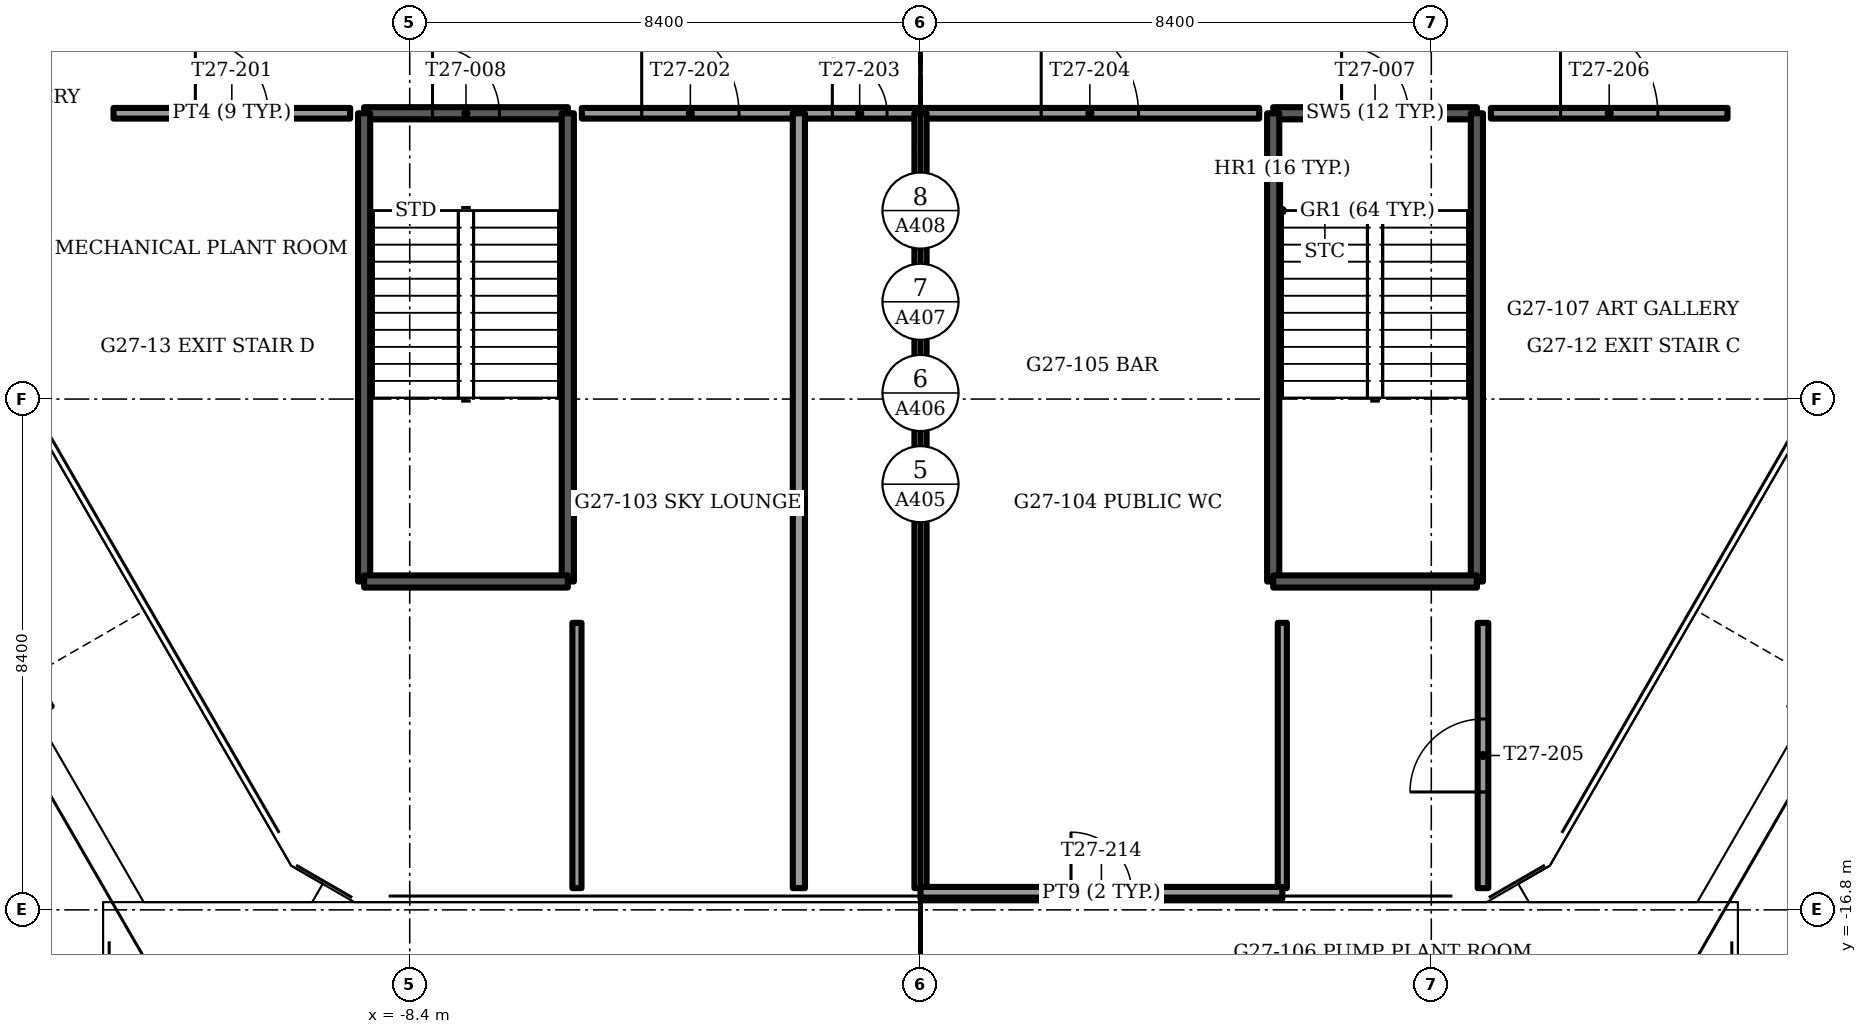
"""IFC4 building model, lengths in metres.
Left out: names, types, materials, properties, quantities, classifications, styles, units other than length and angle.
Written with IfcOpenShell. Run it as: python <this file> out.ifc"""

import sys

from ifc_helpers import new_model, si_unit, direction, frame, frame_2d, origin, place, context, subcontext, project, spatial, rectangle, extrude, element, fill, save


model = new_model("IFC4")
c1 = context("Model", 3, precision=1e-05, world=origin(), true_north=direction((0.0, 1.0)))
c2 = subcontext(c1, "Body", "Model", "MODEL_VIEW")
j1 = project(units=[si_unit("LENGTHUNIT", "METRE"), si_unit("PLANEANGLEUNIT", "RADIAN")], contexts=[c1])
p1 = place(None, origin())
s1 = spatial("IfcSite", under=j1, at=p1, CompositionType="ELEMENT")
p2 = place(p1, origin())
s2 = spatial("IfcBuilding", under=s1, at=p2, CompositionType="ELEMENT")
p3 = place(p2, frame((0.0, 0.0, 108.0)))
s3 = spatial("IfcBuildingStorey", under=s2, at=p3, CompositionType="ELEMENT", Elevation=108.0)
p4 = place(p3, frame((5.8, -3.7, -0.3), z_axis=(0.0, 0.0, 1.0), x_axis=(1.0, 0.0, 0.0)))
e1 = element("IfcWall", 1, at=p4, inside=s3, PredefinedType="SOLIDWALL", context=c2, shape_type="SweptSolid", body=[
    extrude(rectangle(XDim=3.35, YDim=0.2, at=frame_2d((1.675, 0.0))), origin(), (0.0, 0.0, 1.0), 8.0),
])
p5 = place(p4, frame((1.125, 0.0, 0.0)))
e2 = element("IfcOpeningElement", 2, at=p5, cuts=e1, PredefinedType="OPENING", context=c2, shape_type="SweptSolid", body=[
    extrude(rectangle(XDim=1.1, YDim=2.1, at=frame_2d((0.55, 1.05))), frame((0.0, 0.1, 0.0), z_axis=(0.0, -1.0, 0.0), x_axis=(1.0, 0.0, 0.0)), (0.0, 0.0, 1.0), 0.2),
])
for number, where, z_axis, x_axis in (
    (3, (5.8, -3.7, -0.3), (0.0, 0.0, 1.0), (0.0, -1.0, 0.0)),
    (4, (9.15, -3.7, -0.3), (0.0, 0.0, 1.0), (0.0, -1.0, 0.0)),
):
    element("IfcWall", number, at=place(p3, frame(where, z_axis=z_axis, x_axis=x_axis)), inside=s3, PredefinedType="SOLIDWALL", context=c2, shape_type="SweptSolid", body=[
        extrude(rectangle(XDim=7.7, YDim=0.2, at=frame_2d((3.85, 0.0))), origin(), (0.0, 0.0, 1.0), 8.0),
    ])
p6 = place(p3, frame((5.8, -11.4, -0.3), z_axis=(0.0, 0.0, 1.0), x_axis=(1.0, 0.0, 0.0)))
e5 = element("IfcWall", 5, at=p6, inside=s3, PredefinedType="SOLIDWALL", context=c2, shape_type="SweptSolid", body=[
    extrude(rectangle(XDim=3.35, YDim=0.2, at=frame_2d((1.675, 0.0))), origin(), (0.0, 0.0, 1.0), 8.0),
])
p7 = place(p3, frame((-9.15, -3.7, -0.3), z_axis=(0.0, 0.0, 1.0), x_axis=(1.0, 0.0, 0.0)))
e6 = element("IfcWall", 6, at=p7, inside=s3, PredefinedType="SOLIDWALL", context=c2, shape_type="SweptSolid", body=[
    extrude(rectangle(XDim=3.35, YDim=0.2, at=frame_2d((1.675, 0.0))), origin(), (0.0, 0.0, 1.0), 8.0),
])
p8 = place(p7, frame((1.125, 0.0, 0.0)))
e7 = element("IfcOpeningElement", 7, at=p8, cuts=e6, PredefinedType="OPENING", context=c2, shape_type="SweptSolid", body=[
    extrude(rectangle(XDim=1.1, YDim=2.1, at=frame_2d((0.55, 1.05))), frame((0.0, 0.1, 0.0), z_axis=(0.0, -1.0, 0.0), x_axis=(1.0, 0.0, 0.0)), (0.0, 0.0, 1.0), 0.2),
])
for number, where, z_axis, x_axis in (
    (8, (-9.15, -3.7, -0.3), (0.0, 0.0, 1.0), (0.0, -1.0, 0.0)),
    (9, (-5.8, -3.7, -0.3), (0.0, 0.0, 1.0), (0.0, -1.0, 0.0)),
):
    element("IfcWall", number, at=place(p3, frame(where, z_axis=z_axis, x_axis=x_axis)), inside=s3, PredefinedType="SOLIDWALL", context=c2, shape_type="SweptSolid", body=[
        extrude(rectangle(XDim=7.7, YDim=0.2, at=frame_2d((3.85, 0.0))), origin(), (0.0, 0.0, 1.0), 8.0),
    ])
p9 = place(p3, frame((-9.15, -11.4, -0.3), z_axis=(0.0, 0.0, 1.0), x_axis=(1.0, 0.0, 0.0)))
e10 = element("IfcWall", 10, at=p9, inside=s3, PredefinedType="SOLIDWALL", context=c2, shape_type="SweptSolid", body=[
    extrude(rectangle(XDim=3.35, YDim=0.2, at=frame_2d((1.675, 0.0))), origin(), (0.0, 0.0, 1.0), 8.0),
])
p10 = place(p3, frame((-13.271, -3.7, 0.0), z_axis=(0.0, 0.0, 1.0), x_axis=(1.0, 0.0, 0.0)))
e11 = element("IfcWall", 11, at=p10, inside=s3, PredefinedType="PARTITIONING", context=c2, shape_type="SweptSolid", body=[
    extrude(rectangle(XDim=3.891, YDim=0.175, at=frame_2d((1.946, 0.0))), origin(), (0.0, 0.0, 1.0), 7.7),
])
p11 = place(p10, frame((1.346, 0.0, 0.0)))
e12 = element("IfcOpeningElement", 12, at=p11, cuts=e11, PredefinedType="OPENING", context=c2, shape_type="SweptSolid", body=[
    extrude(rectangle(XDim=1.2, YDim=2.1, at=frame_2d((0.6, 1.05))), frame((0.0, 0.087, 0.0), z_axis=(0.0, -1.0, 0.0), x_axis=(1.0, 0.0, 0.0)), (0.0, 0.0, 1.0), 0.175),
])
p12 = place(p3, frame((-5.57, -3.7, 0.0), z_axis=(0.0, 0.0, 1.0), x_axis=(1.0, 0.0, 0.0)))
e13 = element("IfcWall", 13, at=p12, inside=s3, PredefinedType="PARTITIONING", context=c2, shape_type="SweptSolid", body=[
    extrude(rectangle(XDim=11.14, YDim=0.175, at=frame_2d((5.57, 0.0))), origin(), (0.0, 0.0, 1.0), 7.7),
])
p13 = place(p12, frame((0.985, 0.0, 0.0)))
e14 = element("IfcOpeningElement", 14, at=p13, cuts=e13, PredefinedType="OPENING", context=c2, shape_type="SweptSolid", body=[
    extrude(rectangle(XDim=1.6, YDim=2.1, at=frame_2d((0.8, 1.05))), frame((0.0, 0.087, 0.0), z_axis=(0.0, -1.0, 0.0), x_axis=(1.0, 0.0, 0.0)), (0.0, 0.0, 1.0), 0.175),
])
p14 = place(p12, frame((4.12, 0.0, 0.0)))
e15 = element("IfcOpeningElement", 15, at=p14, cuts=e13, PredefinedType="OPENING", context=c2, shape_type="SweptSolid", body=[
    extrude(rectangle(XDim=0.9, YDim=2.1, at=frame_2d((0.45, 1.05))), frame((0.0, 0.087, 0.0), z_axis=(0.0, -1.0, 0.0), x_axis=(1.0, 0.0, 0.0)), (0.0, 0.0, 1.0), 0.175),
])
p15 = place(p12, frame((7.555, 0.0, 0.0)))
e16 = element("IfcOpeningElement", 16, at=p15, cuts=e13, PredefinedType="OPENING", context=c2, shape_type="SweptSolid", body=[
    extrude(rectangle(XDim=1.6, YDim=2.1, at=frame_2d((0.8, 1.05))), frame((0.0, 0.087, 0.0), z_axis=(0.0, -1.0, 0.0), x_axis=(1.0, 0.0, 0.0)), (0.0, 0.0, 1.0), 0.175),
])
p16 = place(p3, frame((9.38, -3.7, 0.0), z_axis=(0.0, 0.0, 1.0), x_axis=(1.0, 0.0, 0.0)))
e17 = element("IfcWall", 17, at=p16, inside=s3, PredefinedType="PARTITIONING", context=c2, shape_type="SweptSolid", body=[
    extrude(rectangle(XDim=3.891, YDim=0.175, at=frame_2d((1.946, 0.0))), origin(), (0.0, 0.0, 1.0), 7.7),
])
p17 = place(p16, frame((1.146, 0.0, 0.0)))
e18 = element("IfcOpeningElement", 18, at=p17, cuts=e17, PredefinedType="OPENING", context=c2, shape_type="SweptSolid", body=[
    extrude(rectangle(XDim=1.6, YDim=2.1, at=frame_2d((0.8, 1.05))), frame((0.0, 0.087, 0.0), z_axis=(0.0, -1.0, 0.0), x_axis=(1.0, 0.0, 0.0)), (0.0, 0.0, 1.0), 0.175),
])
p18 = place(p3, frame((9.25, -16.442, 0.0), z_axis=(0.0, 0.0, 1.0), x_axis=(0.0, 1.0, 0.0)))
e19 = element("IfcWall", 19, at=p18, inside=s3, PredefinedType="PARTITIONING", context=c2, shape_type="SweptSolid", body=[
    extrude(rectangle(XDim=4.362, YDim=0.175, at=frame_2d((2.181, 0.0))), origin(), (0.0, 0.0, 1.0), 7.7),
])
p19 = place(p18, frame((1.581, 0.0, 0.0)))
e20 = element("IfcOpeningElement", 20, at=p19, cuts=e19, PredefinedType="OPENING", context=c2, shape_type="SweptSolid", body=[
    extrude(rectangle(XDim=1.2, YDim=2.1, at=frame_2d((0.6, 1.05))), frame((0.0, 0.087, 0.0), z_axis=(0.0, -1.0, 0.0), x_axis=(1.0, 0.0, 0.0)), (0.0, 0.0, 1.0), 0.175),
])
for number, where, z_axis, x_axis in (
    (21, (-2.0, -16.443, 0.0), (0.0, 0.0, 1.0), (0.0, 1.0, 0.0)),
    (22, (0.0, -16.443, 0.0), (0.0, 0.0, 1.0), (0.0, 1.0, 0.0)),
):
    element("IfcWall", number, at=place(p3, frame(where, z_axis=z_axis, x_axis=x_axis)), inside=s3, PredefinedType="PARTITIONING", context=c2, shape_type="SweptSolid", body=[
        extrude(rectangle(XDim=12.743, YDim=0.2, at=frame_2d((6.371, 0.0))), origin(), (0.0, 0.0, 1.0), 7.7),
    ])
for number, where, z_axis, x_axis in (
    (23, (-5.65, -16.443, 0.0), (0.0, 0.0, 1.0), (0.0, 1.0, 0.0)),
    (24, (5.95, -16.443, 0.0), (0.0, 0.0, 1.0), (0.0, 1.0, 0.0)),
):
    element("IfcWall", number, at=place(p3, frame(where, z_axis=z_axis, x_axis=x_axis)), inside=s3, PredefinedType="PARTITIONING", context=c2, shape_type="SweptSolid", body=[
        extrude(rectangle(XDim=4.363, YDim=0.15, at=frame_2d((2.181, 0.0))), origin(), (0.0, 0.0, 1.0), 7.7),
    ])
p20 = place(p3, frame((0.0, -16.523, 0.0), z_axis=(0.0, 0.0, 1.0), x_axis=(1.0, 0.0, 0.0)))
e25 = element("IfcWall", 25, at=p20, inside=s3, PredefinedType="PARTITIONING", context=c2, shape_type="SweptSolid", body=[
    extrude(rectangle(XDim=5.95, YDim=0.2, at=frame_2d((2.975, 0.0))), origin(), (0.0, 0.0, 1.0), 7.7),
])
p21 = place(p20, frame((2.475, 0.0, 0.0)))
e26 = element("IfcOpeningElement", 26, at=p21, cuts=e25, PredefinedType="OPENING", context=c2, shape_type="SweptSolid", body=[
    extrude(rectangle(XDim=1.0, YDim=2.1, at=frame_2d((0.5, 1.05))), frame((0.0, 0.1, 0.0), z_axis=(0.0, -1.0, 0.0), x_axis=(1.0, 0.0, 0.0)), (0.0, 0.0, 1.0), 0.2),
])
p22 = place(p5, origin())
e27 = element("IfcDoor", 27, at=p22, inside=s3, OperationType="SINGLE_SWING_LEFT", PredefinedType="DOOR", context=c2, shape_type="SweptSolid", body=[
    extrude(rectangle(XDim=1.1, YDim=2.1, at=frame_2d((0.55, 1.05))), frame((0.0, 0.025, 0.0), z_axis=(0.0, -1.0, 0.0), x_axis=(1.0, 0.0, 0.0)), (0.0, 0.0, 1.0), 0.05),
])
fill(e2, e27)
p23 = place(p8, origin())
e28 = element("IfcDoor", 28, at=p23, inside=s3, OperationType="SINGLE_SWING_LEFT", PredefinedType="DOOR", context=c2, shape_type="SweptSolid", body=[
    extrude(rectangle(XDim=1.1, YDim=2.1, at=frame_2d((0.55, 1.05))), frame((0.0, 0.025, 0.0), z_axis=(0.0, -1.0, 0.0), x_axis=(1.0, 0.0, 0.0)), (0.0, 0.0, 1.0), 0.05),
])
fill(e7, e28)
p24 = place(p11, origin())
e29 = element("IfcDoor", 29, at=p24, inside=s3, OperationType="SINGLE_SWING_LEFT", PredefinedType="DOOR", context=c2, shape_type="SweptSolid", body=[
    extrude(rectangle(XDim=1.2, YDim=2.1, at=frame_2d((0.6, 1.05))), frame((0.0, 0.025, 0.0), z_axis=(0.0, -1.0, 0.0), x_axis=(1.0, 0.0, 0.0)), (0.0, 0.0, 1.0), 0.05),
])
fill(e12, e29)
p25 = place(p13, origin())
e30 = element("IfcDoor", 30, at=p25, inside=s3, OperationType="DOUBLE_DOOR_SINGLE_SWING", PredefinedType="DOOR", context=c2, shape_type="SweptSolid", body=[
    extrude(rectangle(XDim=1.6, YDim=2.1, at=frame_2d((0.8, 1.05))), frame((0.0, 0.025, 0.0), z_axis=(0.0, -1.0, 0.0), x_axis=(1.0, 0.0, 0.0)), (0.0, 0.0, 1.0), 0.05),
])
fill(e14, e30)
p26 = place(p14, origin())
e31 = element("IfcDoor", 31, at=p26, inside=s3, OperationType="SINGLE_SWING_LEFT", PredefinedType="DOOR", context=c2, shape_type="SweptSolid", body=[
    extrude(rectangle(XDim=0.9, YDim=2.1, at=frame_2d((0.45, 1.05))), frame((0.0, 0.025, 0.0), z_axis=(0.0, -1.0, 0.0), x_axis=(1.0, 0.0, 0.0)), (0.0, 0.0, 1.0), 0.05),
])
fill(e15, e31)
p27 = place(p15, origin())
e32 = element("IfcDoor", 32, at=p27, inside=s3, OperationType="DOUBLE_DOOR_SINGLE_SWING", PredefinedType="DOOR", context=c2, shape_type="SweptSolid", body=[
    extrude(rectangle(XDim=1.6, YDim=2.1, at=frame_2d((0.8, 1.05))), frame((0.0, 0.025, 0.0), z_axis=(0.0, -1.0, 0.0), x_axis=(1.0, 0.0, 0.0)), (0.0, 0.0, 1.0), 0.05),
])
fill(e16, e32)
p28 = place(p19, origin())
e33 = element("IfcDoor", 33, at=p28, inside=s3, OperationType="SINGLE_SWING_LEFT", PredefinedType="DOOR", context=c2, shape_type="SweptSolid", body=[
    extrude(rectangle(XDim=1.2, YDim=2.1, at=frame_2d((0.6, 1.05))), frame((0.0, 0.025, 0.0), z_axis=(0.0, -1.0, 0.0), x_axis=(1.0, 0.0, 0.0)), (0.0, 0.0, 1.0), 0.05),
])
fill(e20, e33)
p29 = place(p17, origin())
e34 = element("IfcDoor", 34, at=p29, inside=s3, OperationType="DOUBLE_DOOR_SINGLE_SWING", PredefinedType="DOOR", context=c2, shape_type="SweptSolid", body=[
    extrude(rectangle(XDim=1.6, YDim=2.1, at=frame_2d((0.8, 1.05))), frame((0.0, 0.025, 0.0), z_axis=(0.0, -1.0, 0.0), x_axis=(1.0, 0.0, 0.0)), (0.0, 0.0, 1.0), 0.05),
])
fill(e18, e34)
p30 = place(p21, origin())
e35 = element("IfcDoor", 35, at=p30, inside=s3, OperationType="SINGLE_SWING_LEFT", PredefinedType="DOOR", context=c2, shape_type="SweptSolid", body=[
    extrude(rectangle(XDim=1.0, YDim=2.1, at=frame_2d((0.5, 1.05))), frame((0.0, 0.025, 0.0), z_axis=(0.0, -1.0, 0.0), x_axis=(1.0, 0.0, 0.0)), (0.0, 0.0, 1.0), 0.05),
])
fill(e26, e35)
save(model, sys.argv[1])
